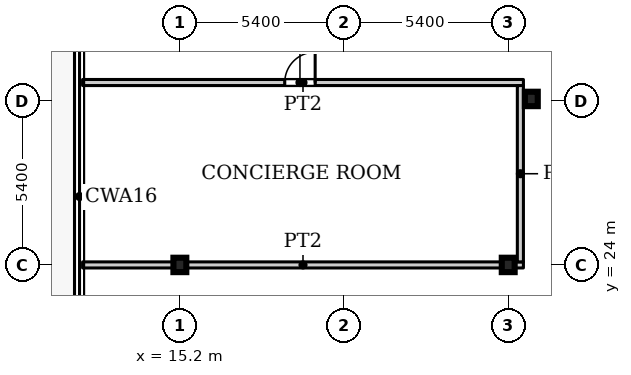
"""IFC4 building model, lengths in metres.
Left out: names, types, materials, properties, quantities, classifications, styles, units other than length and angle.
Written with IfcOpenShell. Run it as: python <this file> out.ifc"""

import sys

from ifc_helpers import new_model, si_unit, direction, frame, frame_2d, origin, origin_2d, place, context, subcontext, project, spatial, rectangle, i_section, extrude, source, transform, mapped, element, fill, save


model = new_model("IFC4")
c1 = context("Model", 3, precision=1e-05, world=origin(), true_north=direction((0.0, 1.0)))
c2 = subcontext(c1, "Body", "Model", "MODEL_VIEW")
j1 = project(units=[si_unit("LENGTHUNIT", "METRE"), si_unit("PLANEANGLEUNIT", "RADIAN")], contexts=[c1])
p1 = place(None, origin())
s1 = spatial("IfcSite", under=j1, at=p1, CompositionType="ELEMENT")
p2 = place(p1, origin())
s2 = spatial("IfcBuilding", under=s1, at=p2, CompositionType="ELEMENT")
p3 = place(p2, origin())
s3 = spatial("IfcBuildingStorey", under=s2, at=p3, CompositionType="ELEMENT", Elevation=0.0)
for number, where, z_axis, x_axis in (
    (1, (15.2, 24.0, 0.0), (0.0, 0.0, 1.0), (1.0, 0.0, 0.0)),
    (2, (26.0, 24.0, 0.0), (0.0, 0.0, 1.0), (1.0, 0.0, 0.0)),
    (3, (26.76, 29.46, 0.0), (0.0, 0.0, 1.0), (1.0, 0.0, 0.0)),
):
    element("IfcColumn", number, at=place(p3, frame(where, z_axis=z_axis, x_axis=x_axis)), inside=s3, PredefinedType="COLUMN", context=c2, shape_type="SweptSolid", body=[
        extrude(i_section(OverallWidth=0.424, OverallDepth=0.474, WebThickness=0.048, FlangeThickness=0.077, FilletRadius=0.014, at=origin_2d()), origin(), (0.0, 0.0, 1.0), 7.5),
    ])
p4 = place(p3, frame((12.0, 24.0, 0.0), z_axis=(0.0, 0.0, 1.0), x_axis=(1.0, 0.0, 0.0)))
e4 = element("IfcWall", 4, at=p4, inside=s3, PredefinedType="PARTITIONING", context=c2, shape_type="SweptSolid", body=[
    extrude(rectangle(XDim=14.5, YDim=0.2, at=frame_2d((7.25, 0.0))), origin(), (0.0, 0.0, 1.0), 7.08),
])
p5 = place(p3, frame((12.0, 30.0, 0.0), z_axis=(0.0, 0.0, 1.0), x_axis=(1.0, 0.0, 0.0)))
e5 = element("IfcWall", 5, at=p5, inside=s3, PredefinedType="PARTITIONING", context=c2, shape_type="SweptSolid", body=[
    extrude(rectangle(XDim=14.5, YDim=0.2, at=frame_2d((7.25, 0.0))), origin(), (0.0, 0.0, 1.0), 7.08),
])
p6 = place(p5, frame((6.65, 0.0, 0.0)))
e6 = element("IfcOpeningElement", 6, at=p6, cuts=e5, PredefinedType="OPENING", context=c2, shape_type="SweptSolid", body=[
    extrude(rectangle(XDim=1.0, YDim=2.1, at=frame_2d((0.5, 1.05))), frame((0.0, 0.11, 0.0), z_axis=(0.0, -1.0, 0.0), x_axis=(1.0, 0.0, 0.0)), (0.0, 0.0, 1.0), 0.22),
])
p7 = place(p3, frame((26.4, 24.1, 0.0), z_axis=(0.0, 0.0, 1.0), x_axis=(0.0, 1.0, 0.0)))
e7 = element("IfcWall", 7, at=p7, inside=s3, PredefinedType="PARTITIONING", context=c2, shape_type="SweptSolid", body=[
    extrude(rectangle(XDim=5.8, YDim=0.2, at=frame_2d((2.9, 0.0))), origin(), (0.0, 0.0, 1.0), 7.08),
])
m1 = source(origin(), c2, "Body", "SweptSolid", [
    extrude(rectangle(XDim=1.0, YDim=2.1, at=frame_2d((0.5, 1.05))), frame((0.0, 0.025, 0.0), z_axis=(0.0, -1.0, 0.0), x_axis=(1.0, 0.0, 0.0)), (0.0, 0.0, 1.0), 0.05),
])
p8 = place(p6, origin())
e8 = element("IfcDoor", 8, at=p8, inside=s3, OperationType="SINGLE_SWING_LEFT", PredefinedType="DOOR", context=c2, shape_type="MappedRepresentation", body=[
    mapped(m1, transform((0.0, 0.0, 0.0), x_axis=(1.0, 0.0, 0.0), y_axis=(0.0, 1.0, 0.0), z_axis=(0.0, 0.0, 1.0), scale=1.0)),
])
fill(e6, e8)
save(model, sys.argv[1])
